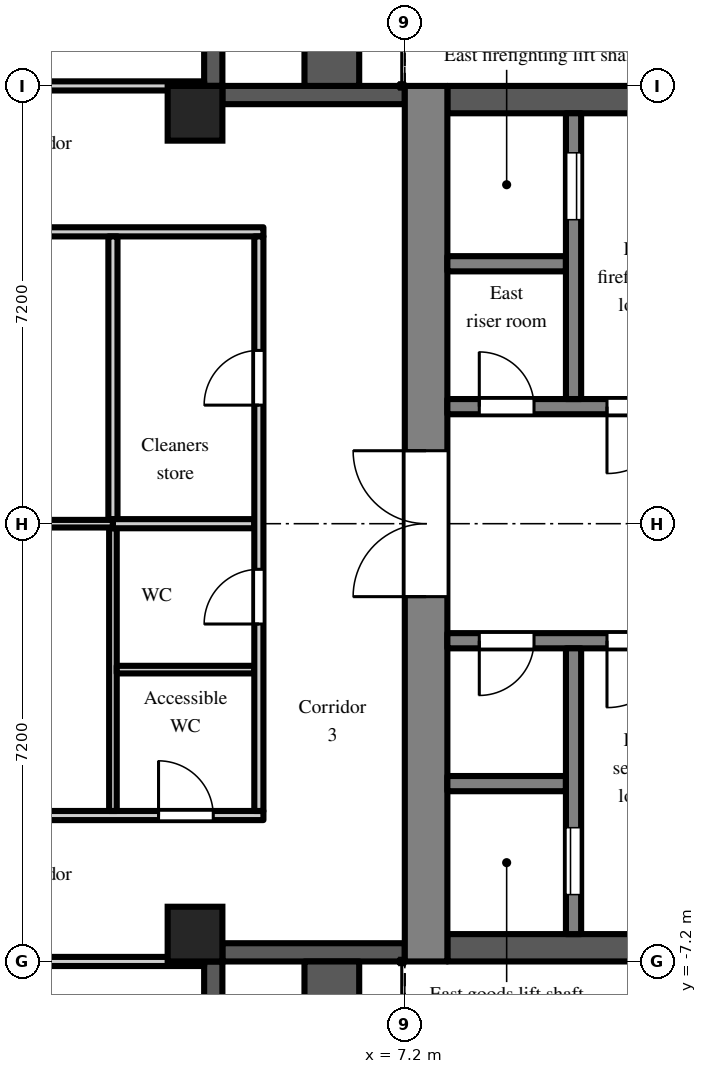
"""IFC4 building model, lengths in metres.
Left out: names, types, materials, properties, quantities, classifications, styles, units other than length and angle.
Written with IfcOpenShell. Run it as: python <this file> out.ifc"""

import sys

from ifc_helpers import new_model, si_unit, direction, frame, frame_2d, origin, origin_2d, place, context, subcontext, project, spatial, rectangle, extrude, element, fill, save


model = new_model("IFC4")
c1 = context("Model", 3, precision=1e-05, world=origin(), true_north=direction((0.0, 1.0)))
c2 = subcontext(c1, "Body", "Model", "MODEL_VIEW")
j1 = project(units=[si_unit("LENGTHUNIT", "METRE"), si_unit("PLANEANGLEUNIT", "RADIAN")], contexts=[c1])
p1 = place(None, origin())
s1 = spatial("IfcSite", under=j1, at=p1, CompositionType="ELEMENT")
p2 = place(p1, origin())
s2 = spatial("IfcBuilding", under=s1, at=p2, CompositionType="ELEMENT")
p3 = place(p2, frame((0.0, 0.0, 129.3)))
s3 = spatial("IfcBuildingStorey", under=s2, at=p3, CompositionType="ELEMENT", Elevation=129.3)
for number, where, z_axis, x_axis in (
    (1, (3.75, -6.75, 0.0), (0.0, 0.0, 1.0), (1.0, 0.0, 0.0)),
    (2, (3.75, 6.75, 0.0), (0.0, 0.0, 1.0), (1.0, 0.0, 0.0)),
):
    element("IfcColumn", number, at=place(p3, frame(where, z_axis=z_axis, x_axis=x_axis)), inside=s3, PredefinedType="COLUMN", context=c2, shape_type="SweptSolid", body=[
        extrude(rectangle(XDim=0.9, YDim=0.9, at=origin_2d()), origin(), (0.0, 0.0, 1.0), 3.0),
    ])
p4 = place(p3, frame((7.2, 7.05, 0.0), z_axis=(0.0, 0.0, 1.0), x_axis=(-1.0, 0.0, 0.0)))
e3 = element("IfcWall", 3, at=p4, inside=s3, PredefinedType="SOLIDWALL", context=c2, shape_type="SweptSolid", body=[
    extrude(rectangle(XDim=3.0, YDim=0.3, at=frame_2d((1.5, 0.0))), origin(), (0.0, 0.0, 1.0), 2.2),
])
p5 = place(p3, frame((4.05, 7.2, 0.0), z_axis=(0.0, 0.0, 1.0), x_axis=(0.0, 1.0, 0.0)))
e4 = element("IfcWall", 4, at=p5, inside=s3, PredefinedType="SOLIDWALL", context=c2, shape_type="SweptSolid", body=[
    extrude(rectangle(XDim=7.2, YDim=0.3, at=frame_2d((3.6, 0.0))), origin(), (0.0, 0.0, 1.0), 2.2),
])
p6 = place(p5, frame((3.0, 0.0, 0.0)))
e5 = element("IfcOpeningElement", 5, at=p6, cuts=e4, PredefinedType="OPENING", context=c2, shape_type="SweptSolid", body=[
    extrude(rectangle(XDim=1.2, YDim=2.05, at=frame_2d((0.6, 1.025))), frame((0.0, 0.16, 0.0), z_axis=(0.0, -1.0, 0.0), x_axis=(1.0, 0.0, 0.0)), (0.0, 0.0, 1.0), 0.32),
])
p7 = place(p5, frame((0.9, 0.0, 0.2)))
e6 = element("IfcOpeningElement", 6, at=p7, cuts=e4, PredefinedType="OPENING", context=c2, shape_type="SweptSolid", body=[
    extrude(rectangle(XDim=1.8, YDim=1.85, at=frame_2d((0.9, 0.925))), frame((0.0, 0.16, 0.0), z_axis=(0.0, -1.0, 0.0), x_axis=(1.0, 0.0, 0.0)), (0.0, 0.0, 1.0), 0.32),
])
p8 = place(p5, frame((4.5, 0.0, 0.2)))
e7 = element("IfcOpeningElement", 7, at=p8, cuts=e4, PredefinedType="OPENING", context=c2, shape_type="SweptSolid", body=[
    extrude(rectangle(XDim=1.8, YDim=1.85, at=frame_2d((0.9, 0.925))), frame((0.0, 0.16, 0.0), z_axis=(0.0, -1.0, 0.0), x_axis=(1.0, 0.0, 0.0)), (0.0, 0.0, 1.0), 0.32),
])
p9 = place(p3, frame((4.05, -14.4, 0.0), z_axis=(0.0, 0.0, 1.0), x_axis=(0.0, 1.0, 0.0)))
e8 = element("IfcWall", 8, at=p9, inside=s3, PredefinedType="SOLIDWALL", context=c2, shape_type="SweptSolid", body=[
    extrude(rectangle(XDim=7.2, YDim=0.3, at=frame_2d((3.6, 0.0))), origin(), (0.0, 0.0, 1.0), 2.2),
])
p10 = place(p9, frame((3.0, 0.0, 0.0)))
e9 = element("IfcOpeningElement", 9, at=p10, cuts=e8, PredefinedType="OPENING", context=c2, shape_type="SweptSolid", body=[
    extrude(rectangle(XDim=1.2, YDim=2.05, at=frame_2d((0.6, 1.025))), frame((0.0, 0.16, 0.0), z_axis=(0.0, -1.0, 0.0), x_axis=(1.0, 0.0, 0.0)), (0.0, 0.0, 1.0), 0.32),
])
p11 = place(p9, frame((0.9, 0.0, 0.2)))
e10 = element("IfcOpeningElement", 10, at=p11, cuts=e8, PredefinedType="OPENING", context=c2, shape_type="SweptSolid", body=[
    extrude(rectangle(XDim=1.8, YDim=1.85, at=frame_2d((0.9, 0.925))), frame((0.0, 0.16, 0.0), z_axis=(0.0, -1.0, 0.0), x_axis=(1.0, 0.0, 0.0)), (0.0, 0.0, 1.0), 0.32),
])
p12 = place(p9, frame((4.5, 0.0, 0.2)))
e11 = element("IfcOpeningElement", 11, at=p12, cuts=e8, PredefinedType="OPENING", context=c2, shape_type="SweptSolid", body=[
    extrude(rectangle(XDim=1.8, YDim=1.85, at=frame_2d((0.9, 0.925))), frame((0.0, 0.16, 0.0), z_axis=(0.0, -1.0, 0.0), x_axis=(1.0, 0.0, 0.0)), (0.0, 0.0, 1.0), 0.32),
])
p13 = place(p3, frame((4.2, -7.05, 0.0), z_axis=(0.0, 0.0, 1.0), x_axis=(1.0, 0.0, 0.0)))
e12 = element("IfcWall", 12, at=p13, inside=s3, PredefinedType="SOLIDWALL", context=c2, shape_type="SweptSolid", body=[
    extrude(rectangle(XDim=3.0, YDim=0.3, at=frame_2d((1.5, 0.0))), origin(), (0.0, 0.0, 1.0), 2.2),
])
for number, where, z_axis, x_axis in (
    (13, (6.0, 7.2, 0.0), (0.0, 0.0, 1.0), (0.0, 1.0, 0.0)),
    (14, (6.0, -14.4, 0.0), (0.0, 0.0, 1.0), (0.0, 1.0, 0.0)),
):
    element("IfcWall", number, at=place(p3, frame(where, z_axis=z_axis, x_axis=x_axis)), inside=s3, PredefinedType="PARAPET", context=c2, shape_type="SweptSolid", body=[
        extrude(rectangle(XDim=7.2, YDim=0.9, at=frame_2d((3.6, 0.0))), origin(), (0.0, 0.0, 1.0), 0.8),
    ])
p14 = place(p3, frame((7.55, -7.2, 0.0), z_axis=(0.0, 0.0, 1.0), x_axis=(0.0, 1.0, 0.0)))
e15 = element("IfcWall", 15, at=p14, inside=s3, PredefinedType="SHEAR", context=c2, shape_type="SweptSolid", body=[
    extrude(rectangle(XDim=14.4, YDim=0.7, at=frame_2d((7.2, 0.0))), origin(), (0.0, 0.0, 1.0), 2.6),
])
p15 = place(p14, frame((6.0, 0.0, 0.0)))
e16 = element("IfcOpeningElement", 16, at=p15, cuts=e15, PredefinedType="OPENING", context=c2, shape_type="SweptSolid", body=[
    extrude(rectangle(XDim=2.4, YDim=2.2, at=frame_2d((1.2, 1.1))), frame((0.0, 0.36, 0.0), z_axis=(0.0, -1.0, 0.0), x_axis=(1.0, 0.0, 0.0)), (0.0, 0.0, 1.0), 0.72),
])
p16 = place(p3, frame((7.9, 6.975, 0.0), z_axis=(0.0, 0.0, 1.0), x_axis=(1.0, 0.0, 0.0)))
e17 = element("IfcWall", 17, at=p16, inside=s3, PredefinedType="SHEAR", context=c2, shape_type="SweptSolid", body=[
    extrude(rectangle(XDim=12.95, YDim=0.45, at=frame_2d((6.475, 0.0))), origin(), (0.0, 0.0, 1.0), 2.6),
])
p17 = place(p3, frame((7.9, 1.925, 0.0), z_axis=(0.0, 0.0, 1.0), x_axis=(1.0, 0.0, 0.0)))
e18 = element("IfcWall", 18, at=p17, inside=s3, PredefinedType="SHEAR", context=c2, shape_type="SweptSolid", body=[
    extrude(rectangle(XDim=12.95, YDim=0.25, at=frame_2d((6.475, 0.0))), origin(), (0.0, 0.0, 1.0), 2.6),
])
p18 = place(p17, frame((4.825, 0.0, 0.0)))
e19 = element("IfcOpeningElement", 19, at=p18, cuts=e18, PredefinedType="OPENING", context=c2, shape_type="SweptSolid", body=[
    extrude(rectangle(XDim=1.1, YDim=2.1, at=frame_2d((0.55, 1.05))), frame((0.0, 0.135, 0.0), z_axis=(0.0, -1.0, 0.0), x_axis=(1.0, 0.0, 0.0)), (0.0, 0.0, 1.0), 0.27),
])
p19 = place(p17, frame((7.025, 0.0, 0.0)))
e20 = element("IfcOpeningElement", 20, at=p19, cuts=e18, PredefinedType="OPENING", context=c2, shape_type="SweptSolid", body=[
    extrude(rectangle(XDim=1.1, YDim=2.1, at=frame_2d((0.55, 1.05))), frame((0.0, 0.135, 0.0), z_axis=(0.0, -1.0, 0.0), x_axis=(1.0, 0.0, 0.0)), (0.0, 0.0, 1.0), 0.27),
])
p20 = place(p17, frame((9.225, 0.0, 0.0)))
e21 = element("IfcOpeningElement", 21, at=p20, cuts=e18, PredefinedType="OPENING", context=c2, shape_type="SweptSolid", body=[
    extrude(rectangle(XDim=1.1, YDim=2.1, at=frame_2d((0.55, 1.05))), frame((0.0, 0.135, 0.0), z_axis=(0.0, -1.0, 0.0), x_axis=(1.0, 0.0, 0.0)), (0.0, 0.0, 1.0), 0.27),
])
p21 = place(p17, frame((0.525, 0.0, 0.0)))
e22 = element("IfcOpeningElement", 22, at=p21, cuts=e18, PredefinedType="OPENING", context=c2, shape_type="SweptSolid", body=[
    extrude(rectangle(XDim=0.9, YDim=2.1, at=frame_2d((0.45, 1.05))), frame((0.0, 0.135, 0.0), z_axis=(0.0, -1.0, 0.0), x_axis=(1.0, 0.0, 0.0)), (0.0, 0.0, 1.0), 0.27),
])
p22 = place(p17, frame((2.625, 0.0, 0.0)))
e23 = element("IfcOpeningElement", 23, at=p22, cuts=e18, PredefinedType="OPENING", context=c2, shape_type="SweptSolid", body=[
    extrude(rectangle(XDim=1.1, YDim=2.1, at=frame_2d((0.55, 1.05))), frame((0.0, 0.135, 0.0), z_axis=(0.0, -1.0, 0.0), x_axis=(1.0, 0.0, 0.0)), (0.0, 0.0, 1.0), 0.27),
])
p23 = place(p17, frame((11.525, 0.0, 0.0)))
e24 = element("IfcOpeningElement", 24, at=p23, cuts=e18, PredefinedType="OPENING", context=c2, shape_type="SweptSolid", body=[
    extrude(rectangle(XDim=0.9, YDim=2.1, at=frame_2d((0.45, 1.05))), frame((0.0, 0.135, 0.0), z_axis=(0.0, -1.0, 0.0), x_axis=(1.0, 0.0, 0.0)), (0.0, 0.0, 1.0), 0.27),
])
p24 = place(p3, frame((7.9, 4.275, 0.0), z_axis=(0.0, 0.0, 1.0), x_axis=(1.0, 0.0, 0.0)))
e25 = element("IfcWall", 25, at=p24, inside=s3, PredefinedType="SHEAR", context=c2, shape_type="SweptSolid", body=[
    extrude(rectangle(XDim=1.95, YDim=0.25, at=frame_2d((0.975, 0.0))), origin(), (0.0, 0.0, 1.0), 2.6),
])
p25 = place(p3, frame((9.975, 2.05, 0.0), z_axis=(0.0, 0.0, 1.0), x_axis=(0.0, 1.0, 0.0)))
e26 = element("IfcWall", 26, at=p25, inside=s3, PredefinedType="SHEAR", context=c2, shape_type="SweptSolid", body=[
    extrude(rectangle(XDim=4.7, YDim=0.25, at=frame_2d((2.35, 0.0))), origin(), (0.0, 0.0, 1.0), 2.6),
])
p26 = place(p25, frame((2.95, 0.0, 0.0)))
e27 = element("IfcOpeningElement", 27, at=p26, cuts=e26, PredefinedType="OPENING", context=c2, shape_type="SweptSolid", body=[
    extrude(rectangle(XDim=1.1, YDim=2.1, at=frame_2d((0.55, 1.05))), frame((0.0, 0.135, 0.0), z_axis=(0.0, -1.0, 0.0), x_axis=(1.0, 0.0, 0.0)), (0.0, 0.0, 1.0), 0.27),
])
p27 = place(p3, frame((7.9, -6.975, 0.0), z_axis=(0.0, 0.0, 1.0), x_axis=(1.0, 0.0, 0.0)))
e28 = element("IfcWall", 28, at=p27, inside=s3, PredefinedType="SHEAR", context=c2, shape_type="SweptSolid", body=[
    extrude(rectangle(XDim=12.95, YDim=0.45, at=frame_2d((6.475, 0.0))), origin(), (0.0, 0.0, 1.0), 2.6),
])
p28 = place(p3, frame((7.9, -1.925, 0.0), z_axis=(0.0, 0.0, 1.0), x_axis=(1.0, 0.0, 0.0)))
e29 = element("IfcWall", 29, at=p28, inside=s3, PredefinedType="SHEAR", context=c2, shape_type="SweptSolid", body=[
    extrude(rectangle(XDim=12.95, YDim=0.25, at=frame_2d((6.475, 0.0))), origin(), (0.0, 0.0, 1.0), 2.6),
])
p29 = place(p28, frame((0.525, 0.0, 0.0)))
e30 = element("IfcOpeningElement", 30, at=p29, cuts=e29, PredefinedType="OPENING", context=c2, shape_type="SweptSolid", body=[
    extrude(rectangle(XDim=0.9, YDim=2.1, at=frame_2d((0.45, 1.05))), frame((0.0, 0.135, 0.0), z_axis=(0.0, -1.0, 0.0), x_axis=(1.0, 0.0, 0.0)), (0.0, 0.0, 1.0), 0.27),
])
p30 = place(p28, frame((2.625, 0.0, 0.0)))
e31 = element("IfcOpeningElement", 31, at=p30, cuts=e29, PredefinedType="OPENING", context=c2, shape_type="SweptSolid", body=[
    extrude(rectangle(XDim=1.1, YDim=2.1, at=frame_2d((0.55, 1.05))), frame((0.0, 0.135, 0.0), z_axis=(0.0, -1.0, 0.0), x_axis=(1.0, 0.0, 0.0)), (0.0, 0.0, 1.0), 0.27),
])
p31 = place(p28, frame((8.225, 0.0, 0.0)))
e32 = element("IfcOpeningElement", 32, at=p31, cuts=e29, PredefinedType="OPENING", context=c2, shape_type="SweptSolid", body=[
    extrude(rectangle(XDim=0.9, YDim=2.1, at=frame_2d((0.45, 1.05))), frame((0.0, 0.135, 0.0), z_axis=(0.0, -1.0, 0.0), x_axis=(1.0, 0.0, 0.0)), (0.0, 0.0, 1.0), 0.27),
])
p32 = place(p3, frame((7.9, -4.275, 0.0), z_axis=(0.0, 0.0, 1.0), x_axis=(1.0, 0.0, 0.0)))
e33 = element("IfcWall", 33, at=p32, inside=s3, PredefinedType="SHEAR", context=c2, shape_type="SweptSolid", body=[
    extrude(rectangle(XDim=1.95, YDim=0.25, at=frame_2d((0.975, 0.0))), origin(), (0.0, 0.0, 1.0), 2.6),
])
p33 = place(p3, frame((9.975, -2.05, 0.0), z_axis=(0.0, 0.0, 1.0), x_axis=(0.0, -1.0, 0.0)))
e34 = element("IfcWall", 34, at=p33, inside=s3, PredefinedType="SHEAR", context=c2, shape_type="SweptSolid", body=[
    extrude(rectangle(XDim=4.7, YDim=0.25, at=frame_2d((2.35, 0.0))), origin(), (0.0, 0.0, 1.0), 2.6),
])
p34 = place(p33, frame((2.95, 0.0, 0.0)))
e35 = element("IfcOpeningElement", 35, at=p34, cuts=e34, PredefinedType="OPENING", context=c2, shape_type="SweptSolid", body=[
    extrude(rectangle(XDim=1.1, YDim=2.1, at=frame_2d((0.55, 1.05))), frame((0.0, 0.135, 0.0), z_axis=(0.0, -1.0, 0.0), x_axis=(1.0, 0.0, 0.0)), (0.0, 0.0, 1.0), 0.27),
])
p35 = place(p3, frame((-4.725, -4.8, 0.0), z_axis=(0.0, 0.0, 1.0), x_axis=(1.0, 0.0, 0.0)))
e36 = element("IfcWall", 36, at=p35, inside=s3, PredefinedType="PARTITIONING", context=c2, shape_type="SweptSolid", body=[
    extrude(rectangle(XDim=9.6, YDim=0.15, at=frame_2d((4.8, 0.0))), origin(), (0.0, 0.0, 1.0), 2.6),
])
p36 = place(p35, frame((7.875, 0.0, 0.0)))
e37 = element("IfcOpeningElement", 37, at=p36, cuts=e36, PredefinedType="OPENING", context=c2, shape_type="SweptSolid", body=[
    extrude(rectangle(XDim=0.9, YDim=2.1, at=frame_2d((0.45, 1.05))), frame((0.0, 0.085, 0.0), z_axis=(0.0, -1.0, 0.0), x_axis=(1.0, 0.0, 0.0)), (0.0, 0.0, 1.0), 0.17),
])
p37 = place(p35, frame((3.025, 0.0, 0.0)))
e38 = element("IfcOpeningElement", 38, at=p37, cuts=e36, PredefinedType="OPENING", context=c2, shape_type="SweptSolid", body=[
    extrude(rectangle(XDim=1.0, YDim=2.1, at=frame_2d((0.5, 1.05))), frame((0.0, 0.085, 0.0), z_axis=(0.0, -1.0, 0.0), x_axis=(1.0, 0.0, 0.0)), (0.0, 0.0, 1.0), 0.17),
])
p38 = place(p3, frame((-4.725, 0.0, 0.0), z_axis=(0.0, 0.0, 1.0), x_axis=(1.0, 0.0, 0.0)))
e39 = element("IfcWall", 39, at=p38, inside=s3, PredefinedType="PARTITIONING", context=c2, shape_type="SweptSolid", body=[
    extrude(rectangle(XDim=7.125, YDim=0.125, at=frame_2d((3.562, 0.0))), origin(), (0.0, 0.0, 1.0), 2.6),
])
p39 = place(p3, frame((-4.725, 4.8, 0.0), z_axis=(0.0, 0.0, 1.0), x_axis=(1.0, 0.0, 0.0)))
e40 = element("IfcWall", 40, at=p39, inside=s3, PredefinedType="PARTITIONING", context=c2, shape_type="SweptSolid", body=[
    extrude(rectangle(XDim=9.6, YDim=0.15, at=frame_2d((4.8, 0.0))), origin(), (0.0, 0.0, 1.0), 2.6),
])
p40 = place(p39, frame((2.625, 0.0, 0.0)))
e41 = element("IfcOpeningElement", 41, at=p40, cuts=e40, PredefinedType="OPENING", context=c2, shape_type="SweptSolid", body=[
    extrude(rectangle(XDim=1.8, YDim=2.1, at=frame_2d((0.9, 1.05))), frame((0.0, 0.085, 0.0), z_axis=(0.0, -1.0, 0.0), x_axis=(1.0, 0.0, 0.0)), (0.0, 0.0, 1.0), 0.17),
])
for number, where, z_axis, x_axis in (
    (42, (1.275, -7.2, 0.0), (0.0, 0.0, 1.0), (1.0, 0.0, 0.0)),
    (43, (1.275, 7.2, 0.0), (0.0, 0.0, 1.0), (1.0, 0.0, 0.0)),
):
    element("IfcWall", number, at=place(p3, frame(where, z_axis=z_axis, x_axis=x_axis)), inside=s3, PredefinedType="PARTITIONING", context=c2, shape_type="SweptSolid", body=[
        extrude(rectangle(XDim=2.625, YDim=0.15, at=frame_2d((1.312, 0.0))), origin(), (0.0, 0.0, 1.0), 2.6),
    ])
p41 = place(p3, frame((2.4, -4.725, 0.0), z_axis=(0.0, 0.0, 1.0), x_axis=(0.0, 1.0, 0.0)))
e44 = element("IfcWall", 44, at=p41, inside=s3, PredefinedType="PARTITIONING", context=c2, shape_type="SweptSolid", body=[
    extrude(rectangle(XDim=4.65, YDim=0.125, at=frame_2d((2.325, 0.0))), origin(), (0.0, 0.0, 1.0), 2.6),
])
p42 = place(p3, frame((2.462, -2.4, 0.0), z_axis=(0.0, 0.0, 1.0), x_axis=(1.0, 0.0, 0.0)))
e45 = element("IfcWall", 45, at=p42, inside=s3, PredefinedType="PARTITIONING", context=c2, shape_type="SweptSolid", body=[
    extrude(rectangle(XDim=2.263, YDim=0.125, at=frame_2d((1.131, 0.0))), origin(), (0.0, 0.0, 1.0), 2.6),
])
p43 = place(p3, frame((2.4, 0.075, 0.0), z_axis=(0.0, 0.0, 1.0), x_axis=(0.0, 1.0, 0.0)))
e46 = element("IfcWall", 46, at=p43, inside=s3, PredefinedType="PARTITIONING", context=c2, shape_type="SweptSolid", body=[
    extrude(rectangle(XDim=4.65, YDim=0.15, at=frame_2d((2.325, 0.0))), origin(), (0.0, 0.0, 1.0), 2.6),
])
p44 = place(p3, frame((2.4, 0.0, 0.0), z_axis=(0.0, 0.0, 1.0), x_axis=(1.0, 0.0, 0.0)))
e47 = element("IfcWall", 47, at=p44, inside=s3, PredefinedType="PARTITIONING", context=c2, shape_type="SweptSolid", body=[
    extrude(rectangle(XDim=2.325, YDim=0.15, at=frame_2d((1.163, 0.0))), origin(), (0.0, 0.0, 1.0), 2.6),
])
p45 = place(p3, frame((4.8, -4.725, 0.0), z_axis=(0.0, 0.0, 1.0), x_axis=(0.0, 1.0, 0.0)))
e48 = element("IfcWall", 48, at=p45, inside=s3, PredefinedType="PARTITIONING", context=c2, shape_type="SweptSolid", body=[
    extrude(rectangle(XDim=9.45, YDim=0.15, at=frame_2d((4.725, 0.0))), origin(), (0.0, 0.0, 1.0), 2.6),
])
p46 = place(p45, frame((3.075, 0.0, 0.0)))
e49 = element("IfcOpeningElement", 49, at=p46, cuts=e48, PredefinedType="OPENING", context=c2, shape_type="SweptSolid", body=[
    extrude(rectangle(XDim=0.9, YDim=2.1, at=frame_2d((0.45, 1.05))), frame((0.0, 0.085, 0.0), z_axis=(0.0, -1.0, 0.0), x_axis=(1.0, 0.0, 0.0)), (0.0, 0.0, 1.0), 0.17),
])
p47 = place(p45, frame((6.675, 0.0, 0.0)))
e50 = element("IfcOpeningElement", 50, at=p47, cuts=e48, PredefinedType="OPENING", context=c2, shape_type="SweptSolid", body=[
    extrude(rectangle(XDim=0.9, YDim=2.1, at=frame_2d((0.45, 1.05))), frame((0.0, 0.085, 0.0), z_axis=(0.0, -1.0, 0.0), x_axis=(1.0, 0.0, 0.0)), (0.0, 0.0, 1.0), 0.17),
])
p48 = place(p26, origin())
e51 = element("IfcDoor", 51, at=p48, inside=s3, OperationType="SLIDING_TO_LEFT", PredefinedType="DOOR", context=c2, shape_type="SweptSolid", body=[
    extrude(rectangle(XDim=1.1, YDim=2.1, at=frame_2d((0.55, 1.05))), frame((0.0, 0.025, 0.0), z_axis=(0.0, -1.0, 0.0), x_axis=(1.0, 0.0, 0.0)), (0.0, 0.0, 1.0), 0.05),
])
fill(e27, e51)
p49 = place(p34, origin())
e52 = element("IfcDoor", 52, at=p49, inside=s3, OperationType="SLIDING_TO_LEFT", PredefinedType="DOOR", context=c2, shape_type="SweptSolid", body=[
    extrude(rectangle(XDim=1.1, YDim=2.1, at=frame_2d((0.55, 1.05))), frame((0.0, 0.025, 0.0), z_axis=(0.0, -1.0, 0.0), x_axis=(1.0, 0.0, 0.0)), (0.0, 0.0, 1.0), 0.05),
])
fill(e35, e52)
p50 = place(p21, origin())
e53 = element("IfcDoor", 53, at=p50, inside=s3, OperationType="SINGLE_SWING_LEFT", PredefinedType="DOOR", context=c2, shape_type="SweptSolid", body=[
    extrude(rectangle(XDim=0.9, YDim=2.1, at=frame_2d((0.45, 1.05))), frame((0.0, 0.025, 0.0), z_axis=(0.0, -1.0, 0.0), x_axis=(1.0, 0.0, 0.0)), (0.0, 0.0, 1.0), 0.05),
])
fill(e22, e53)
p51 = place(p29, frame((0.9, 0.0, 0.0), z_axis=(0.0, 0.0, 1.0), x_axis=(-1.0, 0.0, 0.0)))
e54 = element("IfcDoor", 54, at=p51, inside=s3, OperationType="SINGLE_SWING_RIGHT", PredefinedType="DOOR", context=c2, shape_type="SweptSolid", body=[
    extrude(rectangle(XDim=0.9, YDim=2.1, at=frame_2d((0.45, 1.05))), frame((0.0, 0.025, 0.0), z_axis=(0.0, -1.0, 0.0), x_axis=(1.0, 0.0, 0.0)), (0.0, 0.0, 1.0), 0.05),
])
fill(e30, e54)
p52 = place(p22, frame((1.1, 0.0, 0.0), z_axis=(0.0, 0.0, 1.0), x_axis=(-1.0, 0.0, 0.0)))
e55 = element("IfcDoor", 55, at=p52, inside=s3, OperationType="SINGLE_SWING_RIGHT", PredefinedType="DOOR", context=c2, shape_type="SweptSolid", body=[
    extrude(rectangle(XDim=1.1, YDim=2.1, at=frame_2d((0.55, 1.05))), frame((0.0, 0.025, 0.0), z_axis=(0.0, -1.0, 0.0), x_axis=(1.0, 0.0, 0.0)), (0.0, 0.0, 1.0), 0.05),
])
fill(e23, e55)
p53 = place(p30, frame((1.1, 0.0, 0.0), z_axis=(0.0, 0.0, 1.0), x_axis=(-1.0, 0.0, 0.0)))
e56 = element("IfcDoor", 56, at=p53, inside=s3, OperationType="SINGLE_SWING_RIGHT", PredefinedType="DOOR", context=c2, shape_type="SweptSolid", body=[
    extrude(rectangle(XDim=1.1, YDim=2.1, at=frame_2d((0.55, 1.05))), frame((0.0, 0.025, 0.0), z_axis=(0.0, -1.0, 0.0), x_axis=(1.0, 0.0, 0.0)), (0.0, 0.0, 1.0), 0.05),
])
fill(e31, e56)
p54 = place(p15, origin())
e57 = element("IfcDoor", 57, at=p54, inside=s3, OperationType="DOUBLE_DOOR_DOUBLE_SWING", PredefinedType="DOOR", context=c2, shape_type="SweptSolid", body=[
    extrude(rectangle(XDim=2.4, YDim=2.2, at=frame_2d((1.2, 1.1))), frame((0.0, 0.025, 0.0), z_axis=(0.0, -1.0, 0.0), x_axis=(1.0, 0.0, 0.0)), (0.0, 0.0, 1.0), 0.05),
])
fill(e16, e57)
p55 = place(p36, origin())
e58 = element("IfcDoor", 58, at=p55, inside=s3, OperationType="SINGLE_SWING_LEFT", PredefinedType="DOOR", context=c2, shape_type="SweptSolid", body=[
    extrude(rectangle(XDim=0.9, YDim=2.1, at=frame_2d((0.45, 1.05))), frame((0.0, 0.025, 0.0), z_axis=(0.0, -1.0, 0.0), x_axis=(1.0, 0.0, 0.0)), (0.0, 0.0, 1.0), 0.05),
])
fill(e37, e58)
p56 = place(p46, origin())
e59 = element("IfcDoor", 59, at=p56, inside=s3, OperationType="SINGLE_SWING_LEFT", PredefinedType="DOOR", context=c2, shape_type="SweptSolid", body=[
    extrude(rectangle(XDim=0.9, YDim=2.1, at=frame_2d((0.45, 1.05))), frame((0.0, 0.025, 0.0), z_axis=(0.0, -1.0, 0.0), x_axis=(1.0, 0.0, 0.0)), (0.0, 0.0, 1.0), 0.05),
])
fill(e49, e59)
p57 = place(p47, origin())
e60 = element("IfcDoor", 60, at=p57, inside=s3, OperationType="SINGLE_SWING_LEFT", PredefinedType="DOOR", context=c2, shape_type="SweptSolid", body=[
    extrude(rectangle(XDim=0.9, YDim=2.1, at=frame_2d((0.45, 1.05))), frame((0.0, 0.025, 0.0), z_axis=(0.0, -1.0, 0.0), x_axis=(1.0, 0.0, 0.0)), (0.0, 0.0, 1.0), 0.05),
])
fill(e50, e60)
save(model, sys.argv[1])
